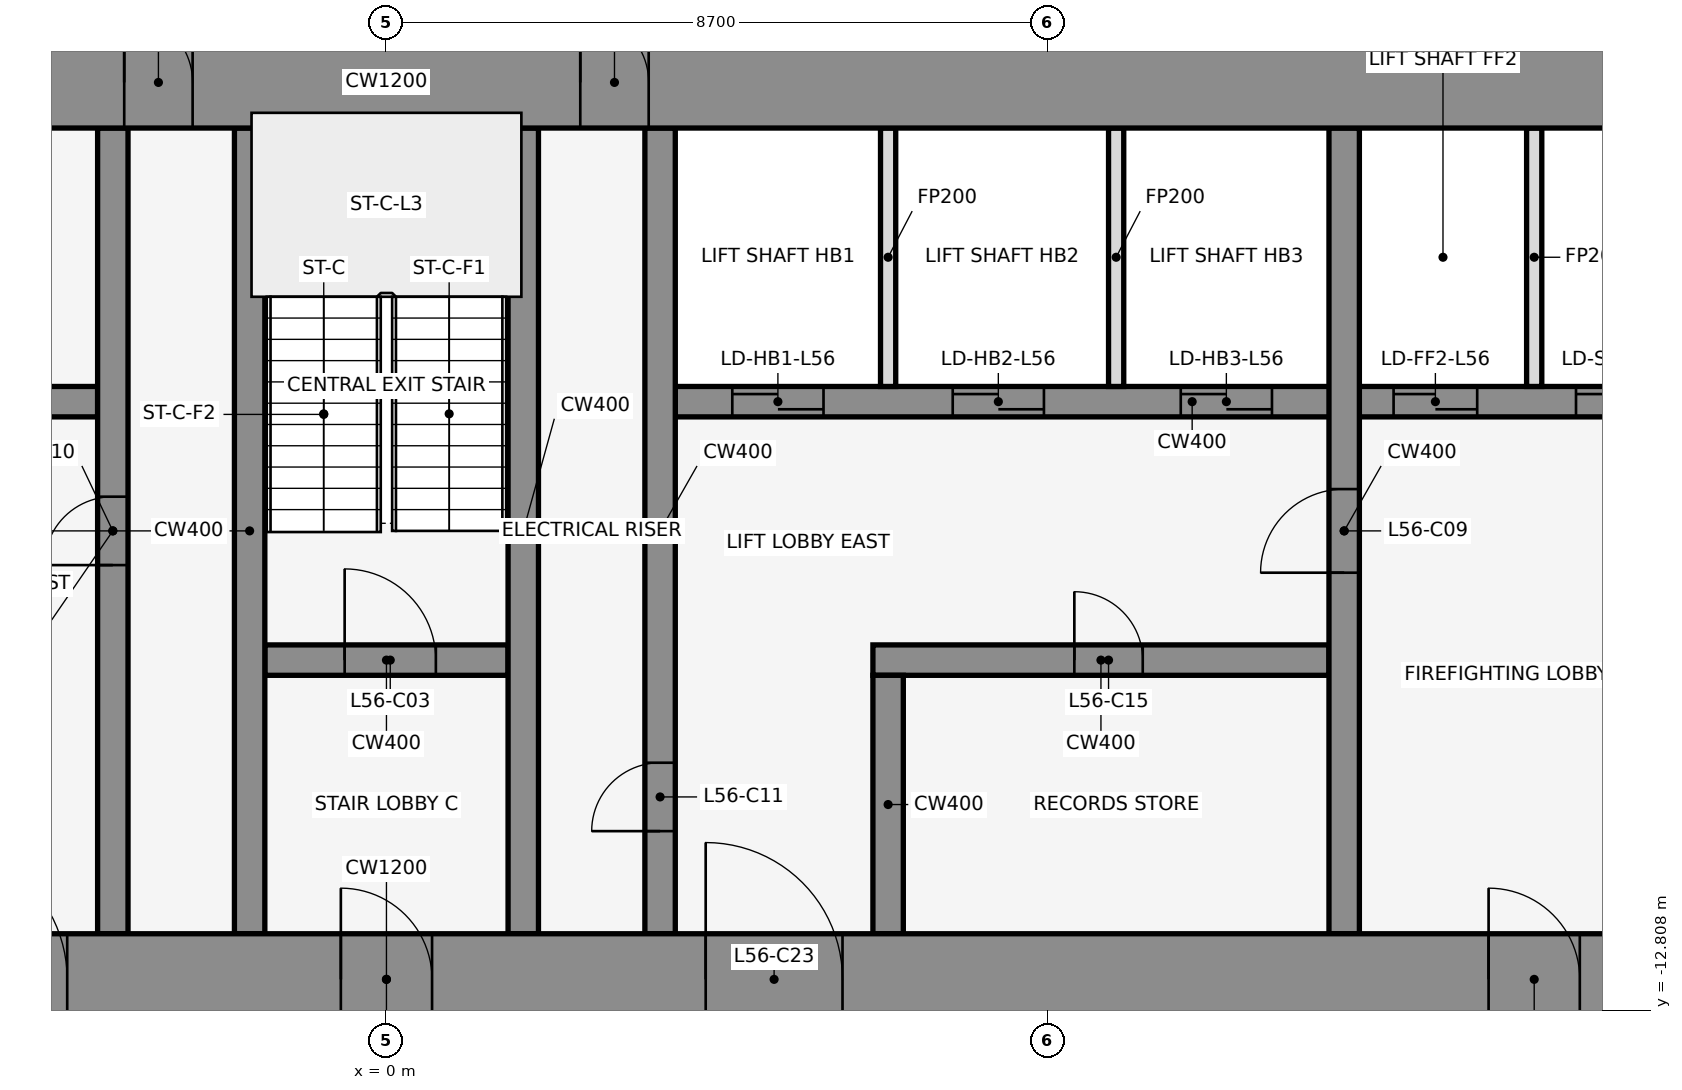
"""IFC4 building model, lengths in metres.
Left out: names, types, materials, properties, quantities, classifications, styles, units other than length and angle.
Written with IfcOpenShell. Run it as: python <this file> out.ifc"""

import sys

from ifc_helpers import new_model, si_unit, direction, frame, frame_2d, origin, place, context, subcontext, project, spatial, rectangle, extrude, element, fill, save


model = new_model("IFC4")
c1 = context("Model", 3, precision=1e-05, world=origin(), true_north=direction((0.0, 1.0)))
c2 = subcontext(c1, "Body", "Model", "MODEL_VIEW")
j1 = project(units=[si_unit("LENGTHUNIT", "METRE"), si_unit("PLANEANGLEUNIT", "RADIAN")], contexts=[c1])
p1 = place(None, origin())
s1 = spatial("IfcSite", under=j1, at=p1, CompositionType="ELEMENT")
p2 = place(p1, origin())
s2 = spatial("IfcBuilding", under=s1, at=p2, CompositionType="ELEMENT")
p3 = place(p2, frame((0.0, 0.0, 249.8)))
s3 = spatial("IfcBuildingStorey", under=s2, at=p3, CompositionType="ELEMENT", Elevation=249.8)
for number, where, z_axis, x_axis in (
    (1, (16.432, -0.105, 0.0), (0.0, 0.0, 1.0), (-0.84, 0.543, 0.0)),
    (2, (1.901, 1.08, 0.0), (0.0, 0.0, 1.0), (-0.84, -0.543, 0.0)),
    (3, (-0.068, -0.105, 0.0), (0.0, 0.0, 1.0), (-0.84, 0.543, 0.0)),
):
    element("IfcWall", number, at=place(p3, frame(where, z_axis=z_axis, x_axis=x_axis)), inside=s3, PredefinedType="STANDARD", context=c2, shape_type="SweptSolid", body=[
        extrude(rectangle(XDim=2.183, YDim=0.25, at=frame_2d((1.091, 0.0))), origin(), (0.0, 0.0, 1.0), 4.05),
    ])
p4 = place(p3, frame((-1.6, -8.2, 0.0), z_axis=(0.0, 0.0, 1.0), x_axis=(1.0, 0.0, 0.0)))
e4 = element("IfcWall", 4, at=p4, inside=s3, PredefinedType="SHEAR", context=c2, shape_type="SweptSolid", body=[
    extrude(rectangle(XDim=3.2, YDim=0.4, at=frame_2d((1.6, 0.0))), origin(), (0.0, 0.0, 1.0), 4.2),
])
p5 = place(p4, frame((1.05, 0.0, 0.0)))
e5 = element("IfcOpeningElement", 5, at=p5, cuts=e4, PredefinedType="OPENING", context=c2, shape_type="SweptSolid", body=[
    extrude(rectangle(XDim=1.2, YDim=2.1, at=frame_2d((0.6, 1.05))), frame((0.0, 0.212, 0.0), z_axis=(0.0, -1.0, 0.0), x_axis=(1.0, 0.0, 0.0)), (0.0, 0.0, 1.0), 0.424),
])
p6 = place(p3, frame((6.4, -8.2, 0.0), z_axis=(0.0, 0.0, 1.0), x_axis=(1.0, 0.0, 0.0)))
e6 = element("IfcWall", 6, at=p6, inside=s3, PredefinedType="SHEAR", context=c2, shape_type="SweptSolid", body=[
    extrude(rectangle(XDim=6.0, YDim=0.4, at=frame_2d((3.0, 0.0))), origin(), (0.0, 0.0, 1.0), 4.2),
])
p7 = place(p6, frame((2.65, 0.0, 0.0)))
e7 = element("IfcOpeningElement", 7, at=p7, cuts=e6, PredefinedType="OPENING", context=c2, shape_type="SweptSolid", body=[
    extrude(rectangle(XDim=0.9, YDim=2.1, at=frame_2d((0.45, 1.05))), frame((0.0, 0.212, 0.0), z_axis=(0.0, -1.0, 0.0), x_axis=(1.0, 0.0, 0.0)), (0.0, 0.0, 1.0), 0.424),
])
p8 = place(p3, frame((-17.4, -4.8, 0.0), z_axis=(0.0, 0.0, 1.0), x_axis=(1.0, 0.0, 0.0)))
e8 = element("IfcWall", 8, at=p8, inside=s3, PredefinedType="SHEAR", context=c2, shape_type="SweptSolid", body=[
    extrude(rectangle(XDim=13.6, YDim=0.4, at=frame_2d((6.8, 0.0))), origin(), (0.0, 0.0, 1.0), 4.2),
])
p9 = place(p8, frame((0.65, 0.0, 0.0)))
e9 = element("IfcOpeningElement", 9, at=p9, cuts=e8, PredefinedType="OPENING", context=c2, shape_type="SweptSolid", body=[
    extrude(rectangle(XDim=1.1, YDim=2.1, at=frame_2d((0.55, 1.05))), frame((0.0, 0.212, 0.0), z_axis=(0.0, -1.0, 0.0), x_axis=(1.0, 0.0, 0.0)), (0.0, 0.0, 1.0), 0.424),
])
p10 = place(p8, frame((2.95, 0.0, 0.0)))
e10 = element("IfcOpeningElement", 10, at=p10, cuts=e8, PredefinedType="OPENING", context=c2, shape_type="SweptSolid", body=[
    extrude(rectangle(XDim=1.1, YDim=2.1, at=frame_2d((0.55, 1.05))), frame((0.0, 0.212, 0.0), z_axis=(0.0, -1.0, 0.0), x_axis=(1.0, 0.0, 0.0)), (0.0, 0.0, 1.0), 0.424),
])
p11 = place(p8, frame((5.85, 0.0, 0.0)))
e11 = element("IfcOpeningElement", 11, at=p11, cuts=e8, PredefinedType="OPENING", context=c2, shape_type="SweptSolid", body=[
    extrude(rectangle(XDim=0.9, YDim=2.1, at=frame_2d((0.45, 1.05))), frame((0.0, 0.212, 0.0), z_axis=(0.0, -1.0, 0.0), x_axis=(1.0, 0.0, 0.0)), (0.0, 0.0, 1.0), 0.424),
])
p12 = place(p8, frame((10.25, 0.0, 0.0)))
e12 = element("IfcOpeningElement", 12, at=p12, cuts=e8, PredefinedType="OPENING", context=c2, shape_type="SweptSolid", body=[
    extrude(rectangle(XDim=0.9, YDim=2.1, at=frame_2d((0.45, 1.05))), frame((0.0, 0.212, 0.0), z_axis=(0.0, -1.0, 0.0), x_axis=(1.0, 0.0, 0.0)), (0.0, 0.0, 1.0), 0.424),
])
p13 = place(p3, frame((3.8, -4.8, 0.0), z_axis=(0.0, 0.0, 1.0), x_axis=(1.0, 0.0, 0.0)))
e13 = element("IfcWall", 13, at=p13, inside=s3, PredefinedType="SHEAR", context=c2, shape_type="SweptSolid", body=[
    extrude(rectangle(XDim=13.6, YDim=0.4, at=frame_2d((6.8, 0.0))), origin(), (0.0, 0.0, 1.0), 4.2),
])
p14 = place(p13, frame((0.75, 0.0, 0.0)))
e14 = element("IfcOpeningElement", 14, at=p14, cuts=e13, PredefinedType="OPENING", context=c2, shape_type="SweptSolid", body=[
    extrude(rectangle(XDim=1.2, YDim=2.1, at=frame_2d((0.6, 1.05))), frame((0.0, 0.212, 0.0), z_axis=(0.0, -1.0, 0.0), x_axis=(1.0, 0.0, 0.0)), (0.0, 0.0, 1.0), 0.424),
])
p15 = place(p13, frame((3.65, 0.0, 0.0)))
e15 = element("IfcOpeningElement", 15, at=p15, cuts=e13, PredefinedType="OPENING", context=c2, shape_type="SweptSolid", body=[
    extrude(rectangle(XDim=1.2, YDim=2.1, at=frame_2d((0.6, 1.05))), frame((0.0, 0.212, 0.0), z_axis=(0.0, -1.0, 0.0), x_axis=(1.0, 0.0, 0.0)), (0.0, 0.0, 1.0), 0.424),
])
p16 = place(p13, frame((6.65, 0.0, 0.0)))
e16 = element("IfcOpeningElement", 16, at=p16, cuts=e13, PredefinedType="OPENING", context=c2, shape_type="SweptSolid", body=[
    extrude(rectangle(XDim=1.2, YDim=2.1, at=frame_2d((0.6, 1.05))), frame((0.0, 0.212, 0.0), z_axis=(0.0, -1.0, 0.0), x_axis=(1.0, 0.0, 0.0)), (0.0, 0.0, 1.0), 0.424),
])
p17 = place(p13, frame((9.45, 0.0, 0.0)))
e17 = element("IfcOpeningElement", 17, at=p17, cuts=e13, PredefinedType="OPENING", context=c2, shape_type="SweptSolid", body=[
    extrude(rectangle(XDim=1.1, YDim=2.1, at=frame_2d((0.55, 1.05))), frame((0.0, 0.212, 0.0), z_axis=(0.0, -1.0, 0.0), x_axis=(1.0, 0.0, 0.0)), (0.0, 0.0, 1.0), 0.424),
])
p18 = place(p13, frame((11.85, 0.0, 0.0)))
e18 = element("IfcOpeningElement", 18, at=p18, cuts=e13, PredefinedType="OPENING", context=c2, shape_type="SweptSolid", body=[
    extrude(rectangle(XDim=1.1, YDim=2.1, at=frame_2d((0.55, 1.05))), frame((0.0, 0.212, 0.0), z_axis=(0.0, -1.0, 0.0), x_axis=(1.0, 0.0, 0.0)), (0.0, 0.0, 1.0), 0.424),
])
p19 = place(p3, frame((-3.6, -11.8, 0.0), z_axis=(0.0, 0.0, 1.0), x_axis=(0.0, 1.0, 0.0)))
e19 = element("IfcWall", 19, at=p19, inside=s3, PredefinedType="SHEAR", context=c2, shape_type="SweptSolid", body=[
    extrude(rectangle(XDim=10.6, YDim=0.4, at=frame_2d((5.3, 0.0))), origin(), (0.0, 0.0, 1.0), 4.2),
])
p20 = place(p19, frame((4.85, 0.0, 0.0)))
e20 = element("IfcOpeningElement", 20, at=p20, cuts=e19, PredefinedType="OPENING", context=c2, shape_type="SweptSolid", body=[
    extrude(rectangle(XDim=0.9, YDim=2.1, at=frame_2d((0.45, 1.05))), frame((0.0, 0.212, 0.0), z_axis=(0.0, -1.0, 0.0), x_axis=(1.0, 0.0, 0.0)), (0.0, 0.0, 1.0), 0.424),
])
for number, where, z_axis, x_axis in (
    (21, (-1.8, -11.8, 0.0), (0.0, 0.0, 1.0), (0.0, 1.0, 0.0)),
    (22, (1.8, -11.8, 0.0), (0.0, 0.0, 1.0), (0.0, 1.0, 0.0)),
):
    element("IfcWall", number, at=place(p3, frame(where, z_axis=z_axis, x_axis=x_axis)), inside=s3, PredefinedType="SHEAR", context=c2, shape_type="SweptSolid", body=[
        extrude(rectangle(XDim=10.6, YDim=0.4, at=frame_2d((5.3, 0.0))), origin(), (0.0, 0.0, 1.0), 4.2),
    ])
p21 = place(p3, frame((3.6, -11.8, 0.0), z_axis=(0.0, 0.0, 1.0), x_axis=(0.0, 1.0, 0.0)))
e23 = element("IfcWall", 23, at=p21, inside=s3, PredefinedType="SHEAR", context=c2, shape_type="SweptSolid", body=[
    extrude(rectangle(XDim=10.6, YDim=0.4, at=frame_2d((5.3, 0.0))), origin(), (0.0, 0.0, 1.0), 4.2),
])
p22 = place(p21, frame((1.35, 0.0, 0.0)))
e24 = element("IfcOpeningElement", 24, at=p22, cuts=e23, PredefinedType="OPENING", context=c2, shape_type="SweptSolid", body=[
    extrude(rectangle(XDim=0.9, YDim=2.1, at=frame_2d((0.45, 1.05))), frame((0.0, 0.212, 0.0), z_axis=(0.0, -1.0, 0.0), x_axis=(1.0, 0.0, 0.0)), (0.0, 0.0, 1.0), 0.424),
])
p23 = place(p3, frame((6.6, -11.8, 0.0), z_axis=(0.0, 0.0, 1.0), x_axis=(0.0, 1.0, 0.0)))
e25 = element("IfcWall", 25, at=p23, inside=s3, PredefinedType="SHEAR", context=c2, shape_type="SweptSolid", body=[
    extrude(rectangle(XDim=3.4, YDim=0.4, at=frame_2d((1.7, 0.0))), origin(), (0.0, 0.0, 1.0), 4.2),
])
for number, where, z_axis, x_axis in (
    (26, (6.6, -4.6, 0.0), (0.0, 0.0, 1.0), (0.0, 1.0, 0.0)),
    (27, (9.6, -4.6, 0.0), (0.0, 0.0, 1.0), (0.0, 1.0, 0.0)),
):
    element("IfcWall", number, at=place(p3, frame(where, z_axis=z_axis, x_axis=x_axis)), inside=s3, PredefinedType="PARTITIONING", context=c2, shape_type="SweptSolid", body=[
        extrude(rectangle(XDim=3.4, YDim=0.2, at=frame_2d((1.7, 0.0))), origin(), (0.0, 0.0, 1.0), 3.039),
    ])
p24 = place(p3, frame((12.6, -11.8, 0.0), z_axis=(0.0, 0.0, 1.0), x_axis=(0.0, 1.0, 0.0)))
e28 = element("IfcWall", 28, at=p24, inside=s3, PredefinedType="SHEAR", context=c2, shape_type="SweptSolid", body=[
    extrude(rectangle(XDim=10.6, YDim=0.4, at=frame_2d((5.3, 0.0))), origin(), (0.0, 0.0, 1.0), 4.2),
])
p25 = place(p24, frame((4.75, 0.0, 0.0)))
e29 = element("IfcOpeningElement", 29, at=p25, cuts=e28, PredefinedType="OPENING", context=c2, shape_type="SweptSolid", body=[
    extrude(rectangle(XDim=1.1, YDim=2.1, at=frame_2d((0.55, 1.05))), frame((0.0, 0.212, 0.0), z_axis=(0.0, -1.0, 0.0), x_axis=(1.0, 0.0, 0.0)), (0.0, 0.0, 1.0), 0.424),
])
p26 = place(p3, frame((15.1, -4.6, 0.0), z_axis=(0.0, 0.0, 1.0), x_axis=(0.0, 1.0, 0.0)))
e30 = element("IfcWall", 30, at=p26, inside=s3, PredefinedType="PARTITIONING", context=c2, shape_type="SweptSolid", body=[
    extrude(rectangle(XDim=3.4, YDim=0.2, at=frame_2d((1.7, 0.0))), origin(), (0.0, 0.0, 1.0), 3.039),
])
p27 = place(p3, frame((-22.0, -0.6, 0.0), z_axis=(0.0, 0.0, 1.0), x_axis=(1.0, 0.0, 0.0)))
e31 = element("IfcWall", 31, at=p27, inside=s3, PredefinedType="SHEAR", context=c2, shape_type="SweptSolid", body=[
    extrude(rectangle(XDim=44.0, YDim=1.2, at=frame_2d((22.0, 0.0))), origin(), (0.0, 0.0, 1.0), 4.2),
])
p28 = place(p27, frame((18.55, 0.0, 0.0)))
e32 = element("IfcOpeningElement", 32, at=p28, cuts=e31, PredefinedType="OPENING", context=c2, shape_type="SweptSolid", body=[
    extrude(rectangle(XDim=0.9, YDim=2.1, at=frame_2d((0.45, 1.05))), frame((0.0, 0.612, 0.0), z_axis=(0.0, -1.0, 0.0), x_axis=(1.0, 0.0, 0.0)), (0.0, 0.0, 1.0), 1.224),
])
p29 = place(p27, frame((24.55, 0.0, 0.0)))
e33 = element("IfcOpeningElement", 33, at=p29, cuts=e31, PredefinedType="OPENING", context=c2, shape_type="SweptSolid", body=[
    extrude(rectangle(XDim=0.9, YDim=2.1, at=frame_2d((0.45, 1.05))), frame((0.0, 0.612, 0.0), z_axis=(0.0, -1.0, 0.0), x_axis=(1.0, 0.0, 0.0)), (0.0, 0.0, 1.0), 1.224),
])
p30 = place(p3, frame((-22.0, -12.4, 0.0), z_axis=(0.0, 0.0, 1.0), x_axis=(1.0, 0.0, 0.0)))
e34 = element("IfcWall", 34, at=p30, inside=s3, PredefinedType="SHEAR", context=c2, shape_type="SweptSolid", body=[
    extrude(rectangle(XDim=44.0, YDim=1.2, at=frame_2d((22.0, 0.0))), origin(), (0.0, 0.0, 1.0), 4.2),
])
p31 = place(p30, frame((2.2, 0.0, 0.0)))
e35 = element("IfcOpeningElement", 35, at=p31, cuts=e34, PredefinedType="OPENING", context=c2, shape_type="SweptSolid", body=[
    extrude(rectangle(XDim=1.2, YDim=2.1, at=frame_2d((0.6, 1.05))), frame((0.0, 0.612, 0.0), z_axis=(0.0, -1.0, 0.0), x_axis=(1.0, 0.0, 0.0)), (0.0, 0.0, 1.0), 1.224),
])
p32 = place(p30, frame((21.4, 0.0, 0.0)))
e36 = element("IfcOpeningElement", 36, at=p32, cuts=e34, PredefinedType="OPENING", context=c2, shape_type="SweptSolid", body=[
    extrude(rectangle(XDim=1.2, YDim=2.1, at=frame_2d((0.6, 1.05))), frame((0.0, 0.612, 0.0), z_axis=(0.0, -1.0, 0.0), x_axis=(1.0, 0.0, 0.0)), (0.0, 0.0, 1.0), 1.224),
])
p33 = place(p30, frame((40.6, 0.0, 0.0)))
e37 = element("IfcOpeningElement", 37, at=p33, cuts=e34, PredefinedType="OPENING", context=c2, shape_type="SweptSolid", body=[
    extrude(rectangle(XDim=1.2, YDim=2.1, at=frame_2d((0.6, 1.05))), frame((0.0, 0.612, 0.0), z_axis=(0.0, -1.0, 0.0), x_axis=(1.0, 0.0, 0.0)), (0.0, 0.0, 1.0), 1.224),
])
p34 = place(p30, frame((16.0, 0.0, 0.0)))
e38 = element("IfcOpeningElement", 38, at=p34, cuts=e34, PredefinedType="OPENING", context=c2, shape_type="SweptSolid", body=[
    extrude(rectangle(XDim=1.8, YDim=2.1, at=frame_2d((0.9, 1.05))), frame((0.0, 0.612, 0.0), z_axis=(0.0, -1.0, 0.0), x_axis=(1.0, 0.0, 0.0)), (0.0, 0.0, 1.0), 1.224),
])
p35 = place(p30, frame((6.3, 0.0, 0.0)))
e39 = element("IfcOpeningElement", 39, at=p35, cuts=e34, PredefinedType="OPENING", context=c2, shape_type="SweptSolid", body=[
    extrude(rectangle(XDim=1.2, YDim=2.1, at=frame_2d((0.6, 1.05))), frame((0.0, 0.612, 0.0), z_axis=(0.0, -1.0, 0.0), x_axis=(1.0, 0.0, 0.0)), (0.0, 0.0, 1.0), 1.224),
])
p36 = place(p30, frame((26.2, 0.0, 0.0)))
e40 = element("IfcOpeningElement", 40, at=p36, cuts=e34, PredefinedType="OPENING", context=c2, shape_type="SweptSolid", body=[
    extrude(rectangle(XDim=1.8, YDim=2.1, at=frame_2d((0.9, 1.05))), frame((0.0, 0.612, 0.0), z_axis=(0.0, -1.0, 0.0), x_axis=(1.0, 0.0, 0.0)), (0.0, 0.0, 1.0), 1.224),
])
p37 = place(p30, frame((36.5, 0.0, 0.0)))
e41 = element("IfcOpeningElement", 41, at=p37, cuts=e34, PredefinedType="OPENING", context=c2, shape_type="SweptSolid", body=[
    extrude(rectangle(XDim=1.2, YDim=2.1, at=frame_2d((0.6, 1.05))), frame((0.0, 0.612, 0.0), z_axis=(0.0, -1.0, 0.0), x_axis=(1.0, 0.0, 0.0)), (0.0, 0.0, 1.0), 1.224),
])
p38 = place(p5, origin())
e42 = element("IfcDoor", 42, at=p38, inside=s3, OperationType="SINGLE_SWING_LEFT", PredefinedType="DOOR", context=c2, shape_type="SweptSolid", body=[
    extrude(rectangle(XDim=1.2, YDim=2.1, at=frame_2d((0.6, 1.05))), frame((0.0, 0.025, 0.0), z_axis=(0.0, -1.0, 0.0), x_axis=(1.0, 0.0, 0.0)), (0.0, 0.0, 1.0), 0.05),
])
fill(e5, e42)
p39 = place(p14, origin())
e43 = element("IfcDoor", 43, at=p39, inside=s3, OperationType="DOUBLE_DOOR_SLIDING", PredefinedType="DOOR", context=c2, shape_type="SweptSolid", body=[
    extrude(rectangle(XDim=1.2, YDim=2.1, at=frame_2d((0.6, 1.05))), frame((0.0, 0.025, 0.0), z_axis=(0.0, -1.0, 0.0), x_axis=(1.0, 0.0, 0.0)), (0.0, 0.0, 1.0), 0.05),
])
fill(e14, e43)
p40 = place(p15, origin())
e44 = element("IfcDoor", 44, at=p40, inside=s3, OperationType="DOUBLE_DOOR_SLIDING", PredefinedType="DOOR", context=c2, shape_type="SweptSolid", body=[
    extrude(rectangle(XDim=1.2, YDim=2.1, at=frame_2d((0.6, 1.05))), frame((0.0, 0.025, 0.0), z_axis=(0.0, -1.0, 0.0), x_axis=(1.0, 0.0, 0.0)), (0.0, 0.0, 1.0), 0.05),
])
fill(e15, e44)
p41 = place(p16, origin())
e45 = element("IfcDoor", 45, at=p41, inside=s3, OperationType="DOUBLE_DOOR_SLIDING", PredefinedType="DOOR", context=c2, shape_type="SweptSolid", body=[
    extrude(rectangle(XDim=1.2, YDim=2.1, at=frame_2d((0.6, 1.05))), frame((0.0, 0.025, 0.0), z_axis=(0.0, -1.0, 0.0), x_axis=(1.0, 0.0, 0.0)), (0.0, 0.0, 1.0), 0.05),
])
fill(e16, e45)
p42 = place(p17, origin())
e46 = element("IfcDoor", 46, at=p42, inside=s3, OperationType="DOUBLE_DOOR_SLIDING", PredefinedType="DOOR", context=c2, shape_type="SweptSolid", body=[
    extrude(rectangle(XDim=1.1, YDim=2.1, at=frame_2d((0.55, 1.05))), frame((0.0, 0.025, 0.0), z_axis=(0.0, -1.0, 0.0), x_axis=(1.0, 0.0, 0.0)), (0.0, 0.0, 1.0), 0.05),
])
fill(e17, e46)
p43 = place(p18, origin())
e47 = element("IfcDoor", 47, at=p43, inside=s3, OperationType="DOUBLE_DOOR_SLIDING", PredefinedType="DOOR", context=c2, shape_type="SweptSolid", body=[
    extrude(rectangle(XDim=1.1, YDim=2.1, at=frame_2d((0.55, 1.05))), frame((0.0, 0.025, 0.0), z_axis=(0.0, -1.0, 0.0), x_axis=(1.0, 0.0, 0.0)), (0.0, 0.0, 1.0), 0.05),
])
fill(e18, e47)
p44 = place(p25, frame((1.1, 0.0, 0.0), z_axis=(0.0, 0.0, 1.0), x_axis=(-1.0, 0.0, 0.0)))
e48 = element("IfcDoor", 48, at=p44, inside=s3, OperationType="SINGLE_SWING_RIGHT", PredefinedType="DOOR", context=c2, shape_type="SweptSolid", body=[
    extrude(rectangle(XDim=1.1, YDim=2.1, at=frame_2d((0.55, 1.05))), frame((0.0, 0.025, 0.0), z_axis=(0.0, -1.0, 0.0), x_axis=(1.0, 0.0, 0.0)), (0.0, 0.0, 1.0), 0.05),
])
fill(e29, e48)
p45 = place(p20, frame((0.9, 0.0, 0.0), z_axis=(0.0, 0.0, 1.0), x_axis=(-1.0, 0.0, 0.0)))
e49 = element("IfcDoor", 49, at=p45, inside=s3, OperationType="SINGLE_SWING_LEFT", PredefinedType="DOOR", context=c2, shape_type="SweptSolid", body=[
    extrude(rectangle(XDim=0.9, YDim=2.1, at=frame_2d((0.45, 1.05))), frame((0.0, 0.025, 0.0), z_axis=(0.0, -1.0, 0.0), x_axis=(1.0, 0.0, 0.0)), (0.0, 0.0, 1.0), 0.05),
])
fill(e20, e49)
p46 = place(p22, origin())
e50 = element("IfcDoor", 50, at=p46, inside=s3, OperationType="SINGLE_SWING_LEFT", PredefinedType="DOOR", context=c2, shape_type="SweptSolid", body=[
    extrude(rectangle(XDim=0.9, YDim=2.1, at=frame_2d((0.45, 1.05))), frame((0.0, 0.025, 0.0), z_axis=(0.0, -1.0, 0.0), x_axis=(1.0, 0.0, 0.0)), (0.0, 0.0, 1.0), 0.05),
])
fill(e24, e50)
p47 = place(p7, frame((0.9, 0.0, 0.0), z_axis=(0.0, 0.0, 1.0), x_axis=(-1.0, 0.0, 0.0)))
e51 = element("IfcDoor", 51, at=p47, inside=s3, OperationType="SINGLE_SWING_RIGHT", PredefinedType="DOOR", context=c2, shape_type="SweptSolid", body=[
    extrude(rectangle(XDim=0.9, YDim=2.1, at=frame_2d((0.45, 1.05))), frame((0.0, 0.025, 0.0), z_axis=(0.0, -1.0, 0.0), x_axis=(1.0, 0.0, 0.0)), (0.0, 0.0, 1.0), 0.05),
])
fill(e7, e51)
p48 = place(p28, origin())
e52 = element("IfcDoor", 52, at=p48, inside=s3, OperationType="SINGLE_SWING_LEFT", PredefinedType="DOOR", context=c2, shape_type="SweptSolid", body=[
    extrude(rectangle(XDim=0.9, YDim=2.1, at=frame_2d((0.45, 1.05))), frame((0.0, 0.025, 0.0), z_axis=(0.0, -1.0, 0.0), x_axis=(1.0, 0.0, 0.0)), (0.0, 0.0, 1.0), 0.05),
])
fill(e32, e52)
p49 = place(p29, origin())
e53 = element("IfcDoor", 53, at=p49, inside=s3, OperationType="SINGLE_SWING_LEFT", PredefinedType="DOOR", context=c2, shape_type="SweptSolid", body=[
    extrude(rectangle(XDim=0.9, YDim=2.1, at=frame_2d((0.45, 1.05))), frame((0.0, 0.025, 0.0), z_axis=(0.0, -1.0, 0.0), x_axis=(1.0, 0.0, 0.0)), (0.0, 0.0, 1.0), 0.05),
])
fill(e33, e53)
p50 = place(p32, frame((1.2, 0.0, 0.0), z_axis=(0.0, 0.0, 1.0), x_axis=(-1.0, 0.0, 0.0)))
e54 = element("IfcDoor", 54, at=p50, inside=s3, OperationType="SINGLE_SWING_RIGHT", PredefinedType="DOOR", context=c2, shape_type="SweptSolid", body=[
    extrude(rectangle(XDim=1.2, YDim=2.1, at=frame_2d((0.6, 1.05))), frame((0.0, 0.025, 0.0), z_axis=(0.0, -1.0, 0.0), x_axis=(1.0, 0.0, 0.0)), (0.0, 0.0, 1.0), 0.05),
])
fill(e36, e54)
p51 = place(p34, origin())
e55 = element("IfcDoor", 55, at=p51, inside=s3, OperationType="SINGLE_SWING_LEFT", PredefinedType="DOOR", context=c2, shape_type="SweptSolid", body=[
    extrude(rectangle(XDim=1.8, YDim=2.1, at=frame_2d((0.9, 1.05))), frame((0.0, 0.025, 0.0), z_axis=(0.0, -1.0, 0.0), x_axis=(1.0, 0.0, 0.0)), (0.0, 0.0, 1.0), 0.05),
])
fill(e38, e55)
p52 = place(p36, origin())
e56 = element("IfcDoor", 56, at=p52, inside=s3, OperationType="SINGLE_SWING_LEFT", PredefinedType="DOOR", context=c2, shape_type="SweptSolid", body=[
    extrude(rectangle(XDim=1.8, YDim=2.1, at=frame_2d((0.9, 1.05))), frame((0.0, 0.025, 0.0), z_axis=(0.0, -1.0, 0.0), x_axis=(1.0, 0.0, 0.0)), (0.0, 0.0, 1.0), 0.05),
])
fill(e40, e56)
p53 = place(p37, frame((1.2, 0.0, 0.0), z_axis=(0.0, 0.0, 1.0), x_axis=(-1.0, 0.0, 0.0)))
e57 = element("IfcDoor", 57, at=p53, inside=s3, OperationType="SINGLE_SWING_RIGHT", PredefinedType="DOOR", context=c2, shape_type="SweptSolid", body=[
    extrude(rectangle(XDim=1.2, YDim=2.1, at=frame_2d((0.6, 1.05))), frame((0.0, 0.025, 0.0), z_axis=(0.0, -1.0, 0.0), x_axis=(1.0, 0.0, 0.0)), (0.0, 0.0, 1.0), 0.05),
])
fill(e41, e57)
save(model, sys.argv[1])
